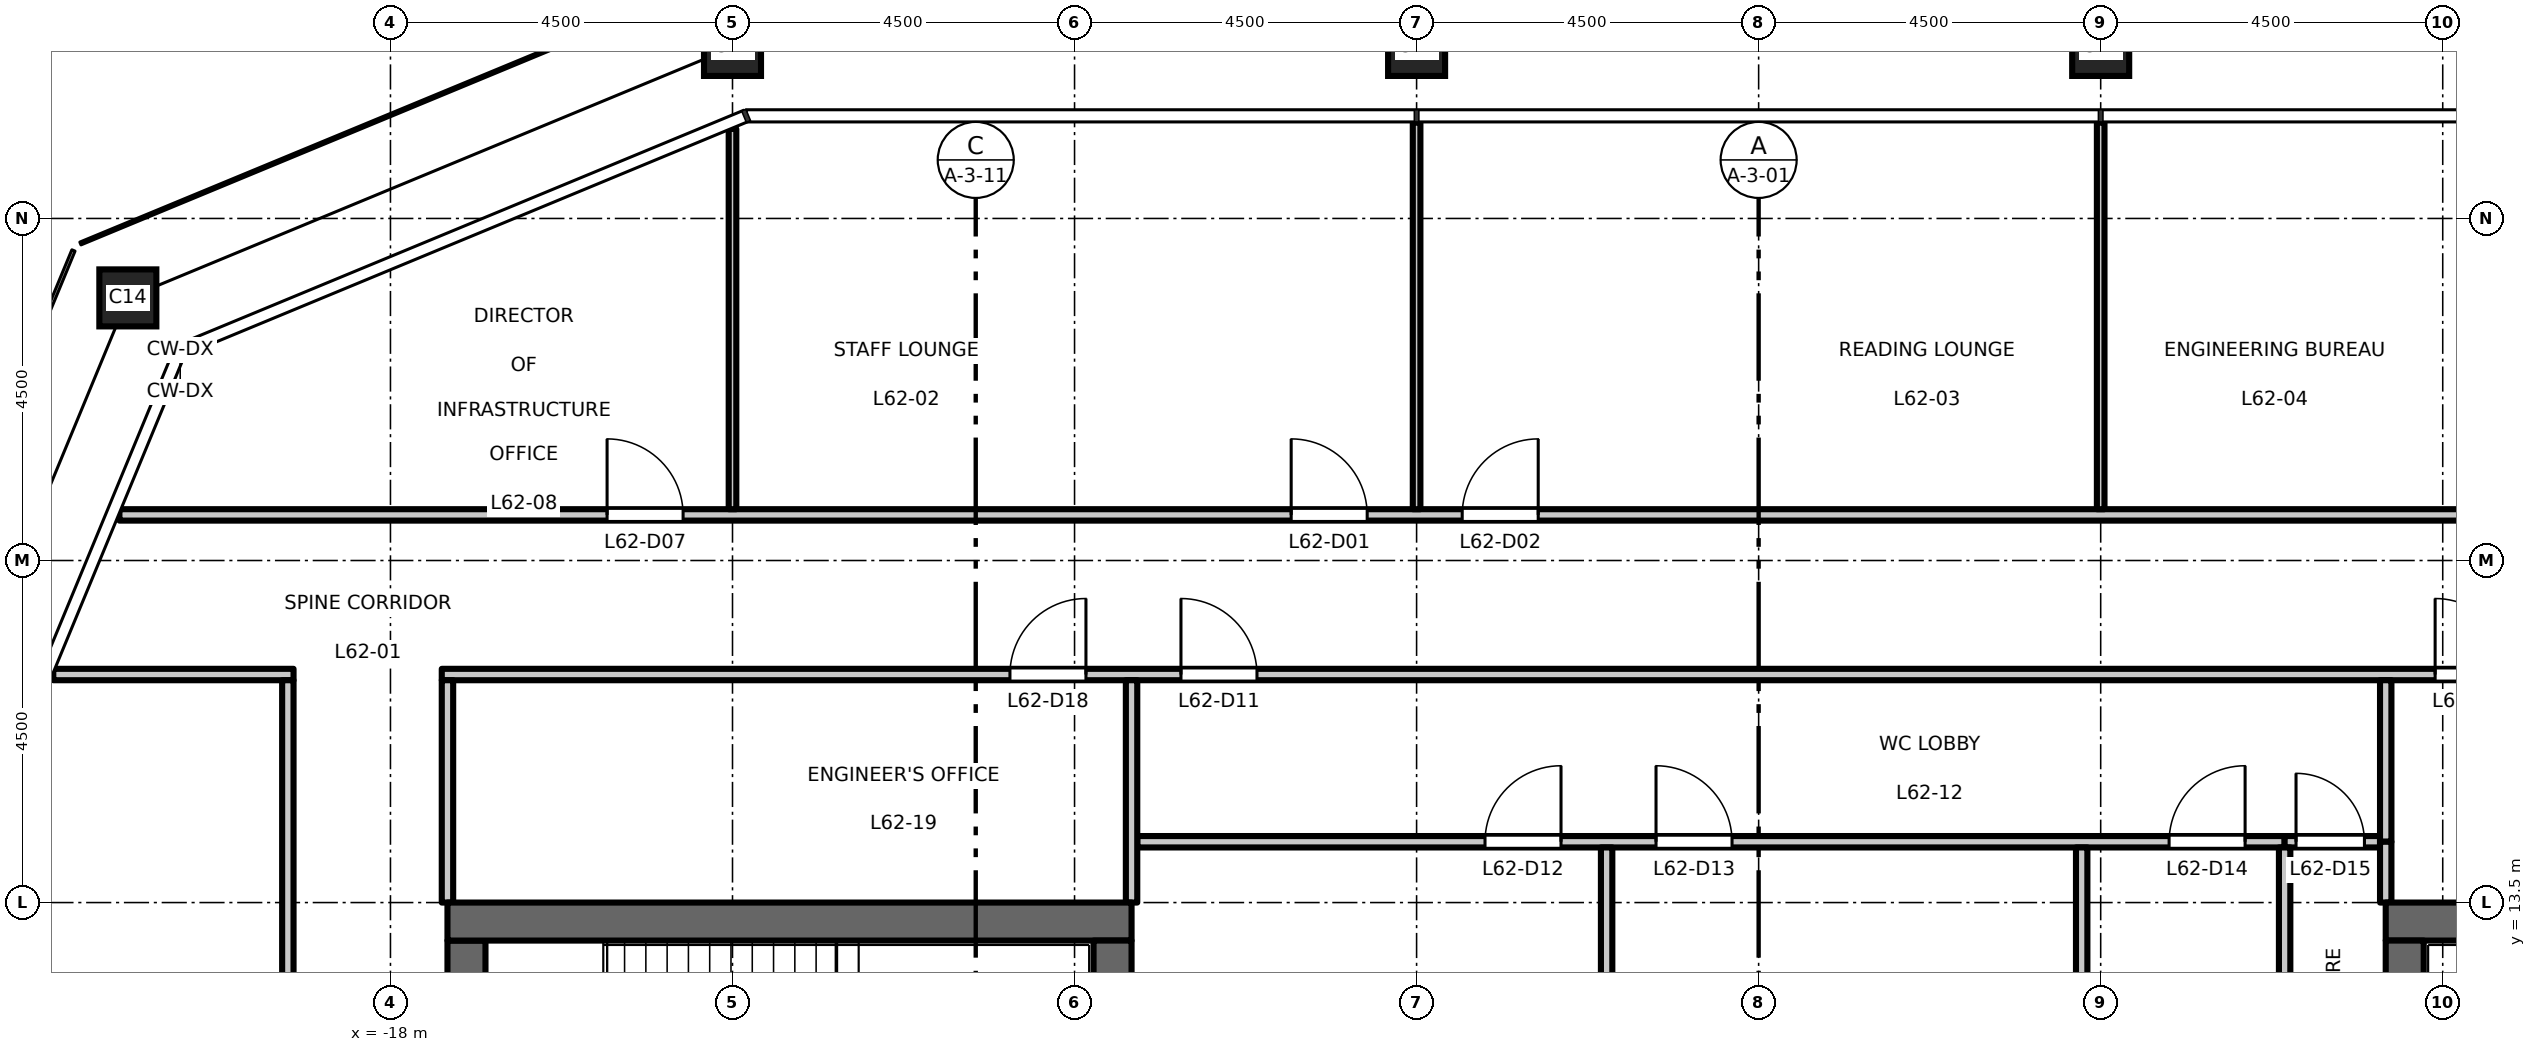
"""IFC4 building model, lengths in metres.
Left out: names, types, materials, properties, quantities, classifications, styles, units other than length and angle.
Written with IfcOpenShell. Run it as: python <this file> out.ifc"""

import sys

from ifc_helpers import new_model, si_unit, direction, frame, frame_2d, origin, origin_2d, place, context, subcontext, project, spatial, rectangle, hollow_rectangle, extrude, element, fill, save


model = new_model("IFC4")
c1 = context("Model", 3, precision=1e-05, world=origin(), true_north=direction((0.0, 1.0)))
c2 = subcontext(c1, "Body", "Model", "MODEL_VIEW")
j1 = project(units=[si_unit("LENGTHUNIT", "METRE"), si_unit("PLANEANGLEUNIT", "RADIAN")], contexts=[c1])
p1 = place(None, origin())
s1 = spatial("IfcSite", under=j1, at=p1, CompositionType="ELEMENT")
p2 = place(p1, origin())
s2 = spatial("IfcBuilding", under=s1, at=p2, CompositionType="ELEMENT")
p3 = place(p2, frame((0.0, 0.0, 289.7)))
s3 = spatial("IfcBuildingStorey", under=s2, at=p3, CompositionType="ELEMENT", Elevation=289.7)
for number, where, z_axis, x_axis in (
    (1, (4.5, 24.75, 0.0), (0.0, 0.0, 1.0), (1.0, 0.0, 0.0)),
    (2, (-4.5, 24.75, 0.0), (0.0, 0.0, 1.0), (1.0, 0.0, 0.0)),
    (3, (-13.5, 24.75, 0.0), (0.0, 0.0, 1.0), (1.0, 0.0, 0.0)),
    (4, (-21.455, 21.455, 0.0), (0.0, 0.0, 1.0), (1.0, 0.0, 0.0)),
):
    element("IfcColumn", number, at=place(p3, frame(where, z_axis=z_axis, x_axis=x_axis)), inside=s3, PredefinedType="COLUMN", context=c2, shape_type="SweptSolid", body=[
        extrude(hollow_rectangle(XDim=0.75, YDim=0.75, WallThickness=0.04, at=origin_2d()), origin(), (0.0, 0.0, 1.0), 4.5),
    ])
p4 = place(p3, frame((-17.0, -13.0, 0.0), z_axis=(0.0, 0.0, 1.0), x_axis=(0.0, 1.0, 0.0)))
e5 = element("IfcWall", 5, at=p4, inside=s3, PredefinedType="SHEAR", context=c2, shape_type="SweptSolid", body=[
    extrude(rectangle(XDim=26.0, YDim=0.5, at=frame_2d((13.0, 0.0))), origin(), (0.0, 0.0, 1.0), 4.35),
])
p5 = place(p4, frame((16.825, 0.0, 0.0)))
e6 = element("IfcOpeningElement", 6, at=p5, cuts=e5, PredefinedType="OPENING", context=c2, shape_type="SweptSolid", body=[
    extrude(rectangle(XDim=1.8, YDim=2.1, at=frame_2d((0.9, 1.05))), frame((0.0, 0.26, 0.0), z_axis=(0.0, -1.0, 0.0), x_axis=(1.0, 0.0, 0.0)), (0.0, 0.0, 1.0), 0.52),
])
p6 = place(p4, frame((7.375, 0.0, 0.0)))
e7 = element("IfcOpeningElement", 7, at=p6, cuts=e5, PredefinedType="OPENING", context=c2, shape_type="SweptSolid", body=[
    extrude(rectangle(XDim=1.8, YDim=2.1, at=frame_2d((0.9, 1.05))), frame((0.0, 0.26, 0.0), z_axis=(0.0, -1.0, 0.0), x_axis=(1.0, 0.0, 0.0)), (0.0, 0.0, 1.0), 0.52),
])
p7 = place(p3, frame((-8.25, 13.25, 0.0), z_axis=(0.0, 0.0, 1.0), x_axis=(-1.0, 0.0, 0.0)))
e8 = element("IfcWall", 8, at=p7, inside=s3, PredefinedType="SHEAR", context=c2, shape_type="SweptSolid", body=[
    extrude(rectangle(XDim=9.0, YDim=0.5, at=frame_2d((4.5, 0.0))), origin(), (0.0, 0.0, 1.0), 4.35),
])
p8 = place(p3, frame((-8.5, -13.0, 0.0), z_axis=(0.0, 0.0, 1.0), x_axis=(0.0, 1.0, 0.0)))
e9 = element("IfcWall", 9, at=p8, inside=s3, PredefinedType="SHEAR", context=c2, shape_type="SweptSolid", body=[
    extrude(rectangle(XDim=26.0, YDim=0.5, at=frame_2d((13.0, 0.0))), origin(), (0.0, 0.0, 1.0), 4.35),
])
p9 = place(p3, frame((8.25, 13.25, 0.0), z_axis=(0.0, 0.0, 1.0), x_axis=(1.0, 0.0, 0.0)))
e10 = element("IfcWall", 10, at=p9, inside=s3, PredefinedType="SHEAR", context=c2, shape_type="SweptSolid", body=[
    extrude(rectangle(XDim=9.0, YDim=0.5, at=frame_2d((4.5, 0.0))), origin(), (0.0, 0.0, 1.0), 4.35),
])
p10 = place(p3, frame((8.5, -13.0, 0.0), z_axis=(0.0, 0.0, 1.0), x_axis=(0.0, 1.0, 0.0)))
e11 = element("IfcWall", 11, at=p10, inside=s3, PredefinedType="SHEAR", context=c2, shape_type="SweptSolid", body=[
    extrude(rectangle(XDim=26.0, YDim=0.5, at=frame_2d((13.0, 0.0))), origin(), (0.0, 0.0, 1.0), 4.35),
])
p11 = place(p3, frame((-8.175, 14.3, 0.0), z_axis=(0.0, 0.0, 1.0), x_axis=(1.0, 0.0, 0.0)))
e12 = element("IfcWall", 12, at=p11, inside=s3, PredefinedType="PARTITIONING", context=c2, shape_type="SweptSolid", body=[
    extrude(rectangle(XDim=15.095, YDim=0.15, at=frame_2d((7.547, 0.0))), origin(), (0.0, 0.0, 1.0), 4.35),
])
p12 = place(p11, frame((4.575, 0.0, 0.0)))
e13 = element("IfcOpeningElement", 13, at=p12, cuts=e12, PredefinedType="OPENING", context=c2, shape_type="SweptSolid", body=[
    extrude(rectangle(XDim=1.0, YDim=2.1, at=frame_2d((0.5, 1.05))), frame((0.0, 0.085, 0.0), z_axis=(0.0, -1.0, 0.0), x_axis=(1.0, 0.0, 0.0)), (0.0, 0.0, 1.0), 0.17),
])
p13 = place(p11, frame((6.825, 0.0, 0.0)))
e14 = element("IfcOpeningElement", 14, at=p13, cuts=e12, PredefinedType="OPENING", context=c2, shape_type="SweptSolid", body=[
    extrude(rectangle(XDim=1.0, YDim=2.1, at=frame_2d((0.5, 1.05))), frame((0.0, 0.085, 0.0), z_axis=(0.0, -1.0, 0.0), x_axis=(1.0, 0.0, 0.0)), (0.0, 0.0, 1.0), 0.17),
])
p14 = place(p11, frame((13.575, 0.0, 0.0)))
e15 = element("IfcOpeningElement", 15, at=p14, cuts=e12, PredefinedType="OPENING", context=c2, shape_type="SweptSolid", body=[
    extrude(rectangle(XDim=1.0, YDim=2.1, at=frame_2d((0.5, 1.05))), frame((0.0, 0.085, 0.0), z_axis=(0.0, -1.0, 0.0), x_axis=(1.0, 0.0, 0.0)), (0.0, 0.0, 1.0), 0.17),
])
p15 = place(p3, frame((6.92, 14.3, 0.0), z_axis=(0.0, 0.0, 1.0), x_axis=(1.0, 0.0, 0.0)))
e16 = element("IfcWall", 16, at=p15, inside=s3, PredefinedType="PARTITIONING", context=c2, shape_type="SweptSolid", body=[
    extrude(rectangle(XDim=1.255, YDim=0.15, at=frame_2d((0.627, 0.0))), origin(), (0.0, 0.0, 1.0), 4.35),
])
p16 = place(p15, frame((0.15, 0.0, 0.0)))
e17 = element("IfcOpeningElement", 17, at=p16, cuts=e16, PredefinedType="OPENING", context=c2, shape_type="SweptSolid", body=[
    extrude(rectangle(XDim=0.9, YDim=2.1, at=frame_2d((0.45, 1.05))), frame((0.0, 0.085, 0.0), z_axis=(0.0, -1.0, 0.0), x_axis=(1.0, 0.0, 0.0)), (0.0, 0.0, 1.0), 0.17),
])
p17 = place(p3, frame((-22.436, 16.5, 0.0), z_axis=(0.0, 0.0, 1.0), x_axis=(1.0, 0.0, 0.0)))
e18 = element("IfcWall", 18, at=p17, inside=s3, PredefinedType="PARTITIONING", context=c2, shape_type="SweptSolid", body=[
    extrude(rectangle(XDim=3.161, YDim=0.15, at=frame_2d((1.581, 0.0))), origin(), (0.0, 0.0, 1.0), 4.35),
])
p18 = place(p3, frame((-17.325, 16.5, 0.0), z_axis=(0.0, 0.0, 1.0), x_axis=(1.0, 0.0, 0.0)))
e19 = element("IfcWall", 19, at=p18, inside=s3, PredefinedType="PARTITIONING", context=c2, shape_type="SweptSolid", body=[
    extrude(rectangle(XDim=34.65, YDim=0.15, at=frame_2d((17.325, 0.0))), origin(), (0.0, 0.0, 1.0), 4.35),
])
p19 = place(p18, frame((9.725, 0.0, 0.0)))
e20 = element("IfcOpeningElement", 20, at=p19, cuts=e19, PredefinedType="OPENING", context=c2, shape_type="SweptSolid", body=[
    extrude(rectangle(XDim=1.0, YDim=2.1, at=frame_2d((0.5, 1.05))), frame((0.0, 0.085, 0.0), z_axis=(0.0, -1.0, 0.0), x_axis=(1.0, 0.0, 0.0)), (0.0, 0.0, 1.0), 0.17),
])
p20 = place(p18, frame((7.475, 0.0, 0.0)))
e21 = element("IfcOpeningElement", 21, at=p20, cuts=e19, PredefinedType="OPENING", context=c2, shape_type="SweptSolid", body=[
    extrude(rectangle(XDim=1.0, YDim=2.1, at=frame_2d((0.5, 1.05))), frame((0.0, 0.085, 0.0), z_axis=(0.0, -1.0, 0.0), x_axis=(1.0, 0.0, 0.0)), (0.0, 0.0, 1.0), 0.17),
])
p21 = place(p18, frame((26.225, 0.0, 0.0)))
e22 = element("IfcOpeningElement", 22, at=p21, cuts=e19, PredefinedType="OPENING", context=c2, shape_type="SweptSolid", body=[
    extrude(rectangle(XDim=1.0, YDim=2.1, at=frame_2d((0.5, 1.05))), frame((0.0, 0.085, 0.0), z_axis=(0.0, -1.0, 0.0), x_axis=(1.0, 0.0, 0.0)), (0.0, 0.0, 1.0), 0.17),
])
p22 = place(p3, frame((-21.566, 18.6, 0.0), z_axis=(0.0, 0.0, 1.0), x_axis=(1.0, 0.0, 0.0)))
e23 = element("IfcWall", 23, at=p22, inside=s3, PredefinedType="PARTITIONING", context=c2, shape_type="SweptSolid", body=[
    extrude(rectangle(XDim=43.132, YDim=0.15, at=frame_2d((21.566, 0.0))), origin(), (0.0, 0.0, 1.0), 4.35),
])
p23 = place(p22, frame((15.416, 0.0, 0.0)))
e24 = element("IfcOpeningElement", 24, at=p23, cuts=e23, PredefinedType="OPENING", context=c2, shape_type="SweptSolid", body=[
    extrude(rectangle(XDim=1.0, YDim=2.1, at=frame_2d((0.5, 1.05))), frame((0.0, 0.085, 0.0), z_axis=(0.0, -1.0, 0.0), x_axis=(1.0, 0.0, 0.0)), (0.0, 0.0, 1.0), 0.17),
])
p24 = place(p22, frame((17.666, 0.0, 0.0)))
e25 = element("IfcOpeningElement", 25, at=p24, cuts=e23, PredefinedType="OPENING", context=c2, shape_type="SweptSolid", body=[
    extrude(rectangle(XDim=1.0, YDim=2.1, at=frame_2d((0.5, 1.05))), frame((0.0, 0.085, 0.0), z_axis=(0.0, -1.0, 0.0), x_axis=(1.0, 0.0, 0.0)), (0.0, 0.0, 1.0), 0.17),
])
p25 = place(p22, frame((33.416, 0.0, 0.0)))
e26 = element("IfcOpeningElement", 26, at=p25, cuts=e23, PredefinedType="OPENING", context=c2, shape_type="SweptSolid", body=[
    extrude(rectangle(XDim=1.0, YDim=2.1, at=frame_2d((0.5, 1.05))), frame((0.0, 0.085, 0.0), z_axis=(0.0, -1.0, 0.0), x_axis=(1.0, 0.0, 0.0)), (0.0, 0.0, 1.0), 0.17),
])
p26 = place(p22, frame((6.416, 0.0, 0.0)))
e27 = element("IfcOpeningElement", 27, at=p26, cuts=e23, PredefinedType="OPENING", context=c2, shape_type="SweptSolid", body=[
    extrude(rectangle(XDim=1.0, YDim=2.1, at=frame_2d((0.5, 1.05))), frame((0.0, 0.085, 0.0), z_axis=(0.0, -1.0, 0.0), x_axis=(1.0, 0.0, 0.0)), (0.0, 0.0, 1.0), 0.17),
])
p27 = place(p22, frame((35.732, 0.0, 0.0)))
e28 = element("IfcOpeningElement", 28, at=p27, cuts=e23, PredefinedType="OPENING", context=c2, shape_type="SweptSolid", body=[
    extrude(rectangle(XDim=1.0, YDim=2.1, at=frame_2d((0.5, 1.05))), frame((0.0, 0.085, 0.0), z_axis=(0.0, -1.0, 0.0), x_axis=(1.0, 0.0, 0.0)), (0.0, 0.0, 1.0), 0.17),
])
p28 = place(p3, frame((-19.35, -16.425, 0.0), z_axis=(0.0, 0.0, 1.0), x_axis=(0.0, 1.0, 0.0)))
e29 = element("IfcWall", 29, at=p28, inside=s3, PredefinedType="PARTITIONING", context=c2, shape_type="SweptSolid", body=[
    extrude(rectangle(XDim=32.85, YDim=0.15, at=frame_2d((16.425, 0.0))), origin(), (0.0, 0.0, 1.0), 4.35),
])
p29 = place(p28, frame((0.525, 0.0, 0.0)))
e30 = element("IfcOpeningElement", 30, at=p29, cuts=e29, PredefinedType="OPENING", context=c2, shape_type="SweptSolid", body=[
    extrude(rectangle(XDim=1.0, YDim=2.1, at=frame_2d((0.5, 1.05))), frame((0.0, 0.085, 0.0), z_axis=(0.0, -1.0, 0.0), x_axis=(1.0, 0.0, 0.0)), (0.0, 0.0, 1.0), 0.17),
])
p30 = place(p3, frame((-17.25, 13.5, 0.0), z_axis=(0.0, 0.0, 1.0), x_axis=(0.0, 1.0, 0.0)))
e31 = element("IfcWall", 31, at=p30, inside=s3, PredefinedType="PARTITIONING", context=c2, shape_type="SweptSolid", body=[
    extrude(rectangle(XDim=2.925, YDim=0.15, at=frame_2d((1.462, 0.0))), origin(), (0.0, 0.0, 1.0), 4.35),
])
p31 = place(p3, frame((-13.5, 18.675, 0.0), z_axis=(0.0, 0.0, 1.0), x_axis=(0.0, 1.0, 0.0)))
e32 = element("IfcWall", 32, at=p31, inside=s3, PredefinedType="PARTITIONING", context=c2, shape_type="SweptSolid", body=[
    extrude(rectangle(XDim=5.003, YDim=0.1, at=frame_2d((2.501, 0.0))), origin(), (0.0, 0.0, 1.0), 3.75),
])
p32 = place(p3, frame((-8.25, 13.5, 0.0), z_axis=(0.0, 0.0, 1.0), x_axis=(0.0, 1.0, 0.0)))
e33 = element("IfcWall", 33, at=p32, inside=s3, PredefinedType="PARTITIONING", context=c2, shape_type="SweptSolid", body=[
    extrude(rectangle(XDim=2.925, YDim=0.15, at=frame_2d((1.462, 0.0))), origin(), (0.0, 0.0, 1.0), 4.35),
])
p33 = place(p3, frame((-4.5, 18.675, 0.0), z_axis=(0.0, 0.0, 1.0), x_axis=(0.0, 1.0, 0.0)))
e34 = element("IfcWall", 34, at=p33, inside=s3, PredefinedType="PARTITIONING", context=c2, shape_type="SweptSolid", body=[
    extrude(rectangle(XDim=5.085, YDim=0.1, at=frame_2d((2.542, 0.0))), origin(), (0.0, 0.0, 1.0), 3.65),
])
for number, where, z_axis, x_axis in (
    (35, (-2.0, 8.37, 0.0), (0.0, 0.0, 1.0), (0.0, 1.0, 0.0)),
    (36, (4.25, 8.37, 0.0), (0.0, 0.0, 1.0), (0.0, 1.0, 0.0)),
):
    element("IfcWall", number, at=place(p3, frame(where, z_axis=z_axis, x_axis=x_axis)), inside=s3, PredefinedType="PARTITIONING", context=c2, shape_type="SweptSolid", body=[
        extrude(rectangle(XDim=5.855, YDim=0.15, at=frame_2d((2.927, 0.0))), origin(), (0.0, 0.0, 1.0), 4.35),
    ])
p34 = place(p3, frame((4.5, 18.675, 0.0), z_axis=(0.0, 0.0, 1.0), x_axis=(0.0, 1.0, 0.0)))
e37 = element("IfcWall", 37, at=p34, inside=s3, PredefinedType="PARTITIONING", context=c2, shape_type="SweptSolid", body=[
    extrude(rectangle(XDim=5.085, YDim=0.1, at=frame_2d((2.542, 0.0))), origin(), (0.0, 0.0, 1.0), 3.65),
])
p35 = place(p3, frame((6.92, 8.029, 0.0), z_axis=(0.0, 0.0, 1.0), x_axis=(0.0, 1.0, 0.0)))
e38 = element("IfcWall", 38, at=p35, inside=s3, PredefinedType="PARTITIONING", context=c2, shape_type="SweptSolid", body=[
    extrude(rectangle(XDim=6.196, YDim=0.15, at=frame_2d((3.098, 0.0))), origin(), (0.0, 0.0, 1.0), 4.35),
])
p36 = place(p3, frame((8.25, 14.3, 0.0), z_axis=(0.0, 0.0, 1.0), x_axis=(0.0, 1.0, 0.0)))
e39 = element("IfcWall", 39, at=p36, inside=s3, PredefinedType="PARTITIONING", context=c2, shape_type="SweptSolid", body=[
    extrude(rectangle(XDim=2.125, YDim=0.15, at=frame_2d((1.062, 0.0))), origin(), (0.0, 0.0, 1.0), 4.35),
])
p37 = place(p3, frame((8.25, 13.5, 0.0), z_axis=(0.0, 0.0, 1.0), x_axis=(0.0, 1.0, 0.0)))
e40 = element("IfcWall", 40, at=p37, inside=s3, PredefinedType="PARTITIONING", context=c2, shape_type="SweptSolid", body=[
    extrude(rectangle(XDim=0.8, YDim=0.15, at=frame_2d((0.4, 0.0))), origin(), (0.0, 0.0, 1.0), 4.35),
])
p38 = place(p23, origin())
e41 = element("IfcDoor", 41, at=p38, inside=s3, OperationType="SINGLE_SWING_LEFT", PredefinedType="DOOR", context=c2, shape_type="SweptSolid", body=[
    extrude(rectangle(XDim=1.0, YDim=2.1, at=frame_2d((0.5, 1.05))), frame((0.0, 0.025, 0.0), z_axis=(0.0, -1.0, 0.0), x_axis=(1.0, 0.0, 0.0)), (0.0, 0.0, 1.0), 0.05),
])
fill(e24, e41)
p39 = place(p24, origin())
e42 = element("IfcDoor", 42, at=p39, inside=s3, OperationType="SINGLE_SWING_RIGHT", PredefinedType="DOOR", context=c2, shape_type="SweptSolid", body=[
    extrude(rectangle(XDim=1.0, YDim=2.1, at=frame_2d((0.5, 1.05))), frame((0.0, 0.025, 0.0), z_axis=(0.0, -1.0, 0.0), x_axis=(1.0, 0.0, 0.0)), (0.0, 0.0, 1.0), 0.05),
])
fill(e25, e42)
p40 = place(p26, origin())
e43 = element("IfcDoor", 43, at=p40, inside=s3, OperationType="SINGLE_SWING_LEFT", PredefinedType="DOOR", context=c2, shape_type="SweptSolid", body=[
    extrude(rectangle(XDim=1.0, YDim=2.1, at=frame_2d((0.5, 1.05))), frame((0.0, 0.025, 0.0), z_axis=(0.0, -1.0, 0.0), x_axis=(1.0, 0.0, 0.0)), (0.0, 0.0, 1.0), 0.05),
])
fill(e27, e43)
p41 = place(p19, origin())
e44 = element("IfcDoor", 44, at=p41, inside=s3, OperationType="SINGLE_SWING_LEFT", PredefinedType="DOOR", context=c2, shape_type="SweptSolid", body=[
    extrude(rectangle(XDim=1.0, YDim=2.1, at=frame_2d((0.5, 1.05))), frame((0.0, 0.025, 0.0), z_axis=(0.0, -1.0, 0.0), x_axis=(1.0, 0.0, 0.0)), (0.0, 0.0, 1.0), 0.05),
])
fill(e20, e44)
p42 = place(p12, origin())
e45 = element("IfcDoor", 45, at=p42, inside=s3, OperationType="SINGLE_SWING_RIGHT", PredefinedType="DOOR", context=c2, shape_type="SweptSolid", body=[
    extrude(rectangle(XDim=1.0, YDim=2.1, at=frame_2d((0.5, 1.05))), frame((0.0, 0.025, 0.0), z_axis=(0.0, -1.0, 0.0), x_axis=(1.0, 0.0, 0.0)), (0.0, 0.0, 1.0), 0.05),
])
fill(e13, e45)
p43 = place(p13, origin())
e46 = element("IfcDoor", 46, at=p43, inside=s3, OperationType="SINGLE_SWING_LEFT", PredefinedType="DOOR", context=c2, shape_type="SweptSolid", body=[
    extrude(rectangle(XDim=1.0, YDim=2.1, at=frame_2d((0.5, 1.05))), frame((0.0, 0.025, 0.0), z_axis=(0.0, -1.0, 0.0), x_axis=(1.0, 0.0, 0.0)), (0.0, 0.0, 1.0), 0.05),
])
fill(e14, e46)
p44 = place(p14, origin())
e47 = element("IfcDoor", 47, at=p44, inside=s3, OperationType="SINGLE_SWING_RIGHT", PredefinedType="DOOR", context=c2, shape_type="SweptSolid", body=[
    extrude(rectangle(XDim=1.0, YDim=2.1, at=frame_2d((0.5, 1.05))), frame((0.0, 0.025, 0.0), z_axis=(0.0, -1.0, 0.0), x_axis=(1.0, 0.0, 0.0)), (0.0, 0.0, 1.0), 0.05),
])
fill(e15, e47)
p45 = place(p16, origin())
e48 = element("IfcDoor", 48, at=p45, inside=s3, OperationType="SINGLE_SWING_LEFT", PredefinedType="DOOR", context=c2, shape_type="SweptSolid", body=[
    extrude(rectangle(XDim=0.9, YDim=2.1, at=frame_2d((0.45, 1.05))), frame((0.0, 0.025, 0.0), z_axis=(0.0, -1.0, 0.0), x_axis=(1.0, 0.0, 0.0)), (0.0, 0.0, 1.0), 0.05),
])
fill(e17, e48)
p46 = place(p20, origin())
e49 = element("IfcDoor", 49, at=p46, inside=s3, OperationType="SINGLE_SWING_RIGHT", PredefinedType="DOOR", context=c2, shape_type="SweptSolid", body=[
    extrude(rectangle(XDim=1.0, YDim=2.1, at=frame_2d((0.5, 1.05))), frame((0.0, 0.025, 0.0), z_axis=(0.0, -1.0, 0.0), x_axis=(1.0, 0.0, 0.0)), (0.0, 0.0, 1.0), 0.05),
])
fill(e21, e49)
p47 = place(p21, origin())
e50 = element("IfcDoor", 50, at=p47, inside=s3, OperationType="SINGLE_SWING_LEFT", PredefinedType="DOOR", context=c2, shape_type="SweptSolid", body=[
    extrude(rectangle(XDim=1.0, YDim=2.1, at=frame_2d((0.5, 1.05))), frame((0.0, 0.025, 0.0), z_axis=(0.0, -1.0, 0.0), x_axis=(1.0, 0.0, 0.0)), (0.0, 0.0, 1.0), 0.05),
])
fill(e22, e50)
save(model, sys.argv[1])
